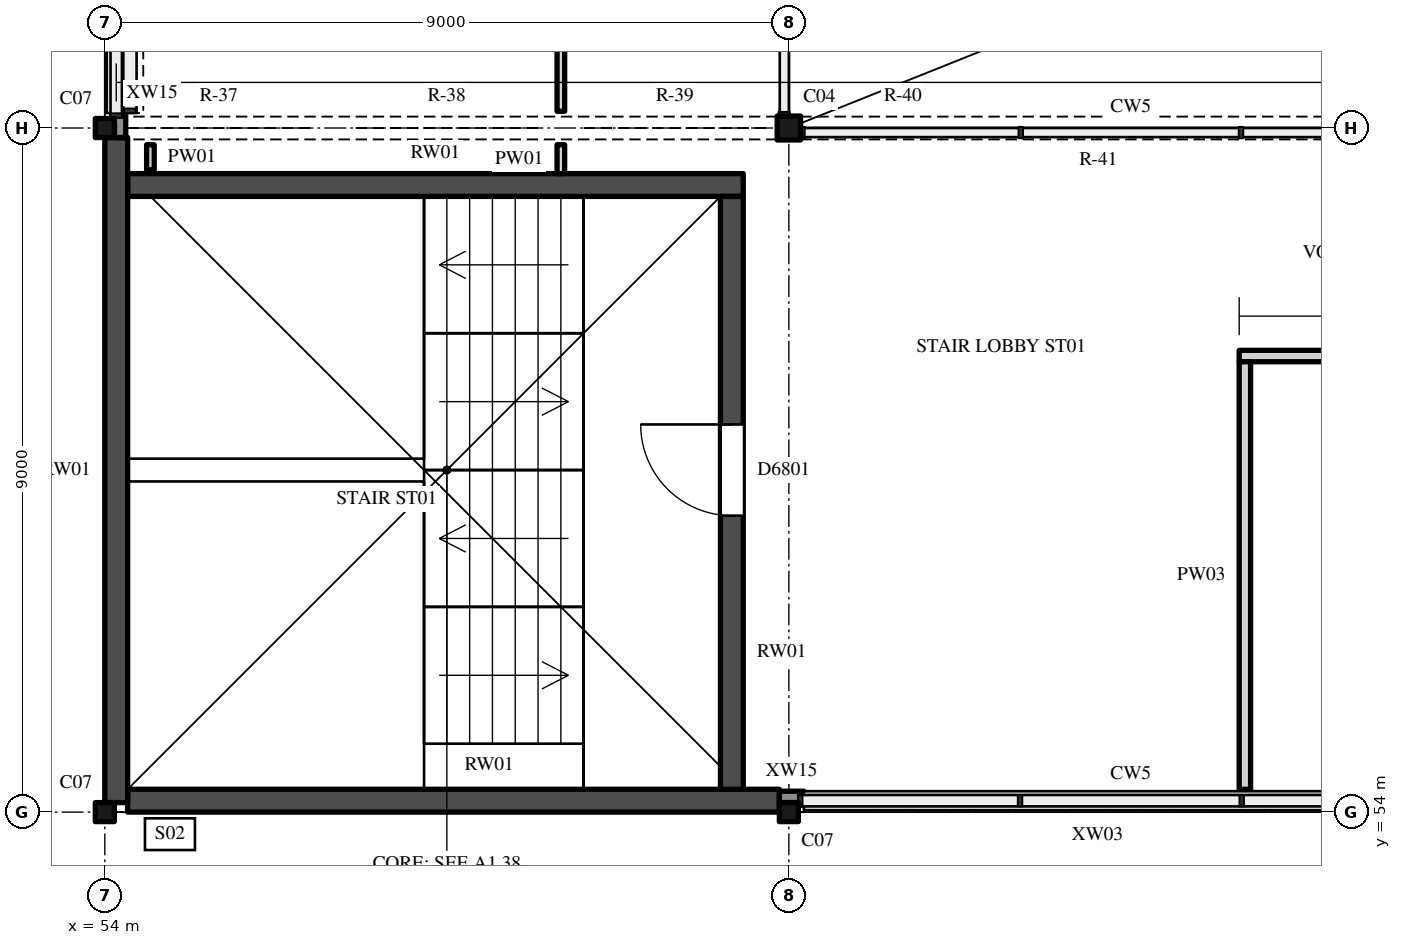
"""IFC4 building model, lengths in metres.
Left out: names, types, materials, properties, quantities, classifications, styles, units other than length and angle.
Written with IfcOpenShell. Run it as: python <this file> out.ifc"""

import sys

from ifc_helpers import new_model, si_unit, direction, frame, frame_2d, origin, origin_2d, place, context, subcontext, project, spatial, polyline, rectangle, hollow_rectangle, i_section, outline, extrude, element, fill, save


model = new_model("IFC4")
c1 = context("Model", 3, precision=1e-05, world=origin(), true_north=direction((0.0, 1.0)))
c2 = subcontext(c1, "Body", "Model", "MODEL_VIEW")
j1 = project(units=[si_unit("LENGTHUNIT", "METRE"), si_unit("PLANEANGLEUNIT", "RADIAN")], contexts=[c1])
p1 = place(None, origin())
s1 = spatial("IfcSite", under=j1, at=p1, CompositionType="ELEMENT")
p2 = place(p1, origin())
s2 = spatial("IfcBuilding", under=s1, at=p2, CompositionType="ELEMENT")
p3 = place(p2, frame((0.0, 0.0, 36.0)))
s3 = spatial("IfcBuildingStorey", under=s2, at=p3, CompositionType="ELEMENT", Elevation=36.0)
for number, where, z_axis, x_axis in (
    (1, (54.0, 54.0, 0.0), (0.0, 0.0, 1.0), (1.0, 0.0, 0.0)),
    (2, (63.0, 54.0, 0.0), (0.0, 0.0, 1.0), (1.0, 0.0, 0.0)),
    (3, (54.0, 63.0, 0.0), (0.0, 0.0, 1.0), (1.0, 0.0, 0.0)),
):
    element("IfcColumn", number, at=place(p3, frame(where, z_axis=z_axis, x_axis=x_axis)), inside=s3, PredefinedType="COLUMN", context=c2, shape_type="SweptSolid", body=[
        extrude(hollow_rectangle(XDim=0.25, YDim=0.25, WallThickness=0.009, InnerFilletRadius=0.013, OuterFilletRadius=0.022, at=origin_2d()), origin(), (0.0, 0.0, 1.0), 8.0),
    ])
p4 = place(p3, frame((63.0, 63.0, 0.0), z_axis=(0.0, 0.0, 1.0), x_axis=(1.0, 0.0, 0.0)))
e4 = element("IfcColumn", 4, at=p4, inside=s3, PredefinedType="COLUMN", context=c2, shape_type="SweptSolid", body=[
    extrude(i_section(OverallWidth=0.307, OverallDepth=0.315, WebThickness=0.012, FlangeThickness=0.019, FilletRadius=0.017, at=origin_2d()), origin(), (0.0, 0.0, 1.0), 8.0),
])
p5 = place(p3, frame((54.3, 54.15, 0.0), z_axis=(0.0, 0.0, 1.0), x_axis=(1.0, 0.0, 0.0)))
e5 = element("IfcWall", 5, at=p5, inside=s3, PredefinedType="SHEAR", context=c2, shape_type="SweptSolid", body=[
    extrude(rectangle(XDim=8.575, YDim=0.3, at=frame_2d((4.288, 0.0))), origin(), (0.0, 0.0, 1.0), 7.864),
])
p6 = place(p3, frame((54.3, 62.25, 0.0), z_axis=(0.0, 0.0, 1.0), x_axis=(1.0, 0.0, 0.0)))
e6 = element("IfcWall", 6, at=p6, inside=s3, PredefinedType="SHEAR", context=c2, shape_type="SweptSolid", body=[
    extrude(rectangle(XDim=8.1, YDim=0.3, at=frame_2d((4.05, 0.0))), origin(), (0.0, 0.0, 1.0), 14.344),
])
p7 = place(p3, frame((54.15, 54.125, 0.0), z_axis=(0.0, 0.0, 1.0), x_axis=(0.0, 1.0, 0.0)))
e7 = element("IfcWall", 7, at=p7, inside=s3, PredefinedType="SHEAR", context=c2, shape_type="SweptSolid", body=[
    extrude(outline(polyline([(0.0, 0.0), (8.75, 0.0), (8.75, 14.844), (0.0, 7.844), (0.0, 0.0)])), frame((0.0, 0.15, 0.0), z_axis=(0.0, -1.0, 0.0), x_axis=(1.0, 0.0, 0.0)), (0.0, 0.0, 1.0), 0.3),
])
p8 = place(p3, frame((62.25, 54.3, 0.0), z_axis=(0.0, 0.0, 1.0), x_axis=(0.0, 1.0, 0.0)))
e8 = element("IfcWall", 8, at=p8, inside=s3, PredefinedType="SHEAR", context=c2, shape_type="SweptSolid", body=[
    extrude(outline(polyline([(0.0, 0.0), (7.8, 0.0), (7.8, 14.224), (0.0, 7.984), (0.0, 0.0)])), frame((0.0, 0.15, 0.0), z_axis=(0.0, -1.0, 0.0), x_axis=(1.0, 0.0, 0.0)), (0.0, 0.0, 1.0), 0.3),
])
p9 = place(p8, frame((3.6, 0.0, 0.0)))
e9 = element("IfcOpeningElement", 9, at=p9, cuts=e8, PredefinedType="OPENING", context=c2, shape_type="SweptSolid", body=[
    extrude(rectangle(XDim=1.2, YDim=2.1, at=frame_2d((0.6, 1.05))), frame((0.0, 0.16, 0.0), z_axis=(0.0, -1.0, 0.0), x_axis=(1.0, 0.0, 0.0)), (0.0, 0.0, 1.0), 0.32),
])
for number, where, z_axis, x_axis in (
    (10, (63.197, 54.15, 0.0), (0.0, 0.0, 1.0), (1.0, 0.0, 0.0)),
    (11, (54.15, 63.197, 0.0), (0.0, 0.0, 1.0), (0.0, 1.0, 0.0)),
):
    element("IfcWall", number, at=place(p3, frame(where, z_axis=z_axis, x_axis=x_axis)), inside=s3, PredefinedType="SOLIDWALL", context=c2, shape_type="SweptSolid", body=[
        extrude(rectangle(XDim=8.642, YDim=0.25, at=frame_2d((4.321, 0.0))), origin(), (0.0, 0.0, 1.0), 1.1),
    ])
p10 = place(p3, frame((62.875, 54.2, 0.0), z_axis=(0.0, 0.0, 1.0), x_axis=(1.0, 0.0, 0.0)))
e12 = element("IfcWall", 12, at=p10, inside=s3, PredefinedType="SOLIDWALL", context=c2, shape_type="SweptSolid", body=[
    extrude(rectangle(XDim=0.322, YDim=0.15, at=frame_2d((0.161, 0.0))), origin(), (0.0, 0.0, 1.0), 7.864),
])
p11 = place(p3, frame((54.2, 62.875, 0.0), z_axis=(0.0, 0.0, 1.0), x_axis=(0.0, 1.0, 0.0)))
e13 = element("IfcWall", 13, at=p11, inside=s3, PredefinedType="SOLIDWALL", context=c2, shape_type="SweptSolid", body=[
    extrude(rectangle(XDim=0.322, YDim=0.15, at=frame_2d((0.161, 0.0))), origin(), (0.0, 0.0, 1.0), 14.844),
])
p12 = place(p3, frame((54.15, 63.0, 15.2), z_axis=(0.0, 0.0, 1.0), x_axis=(1.0, 0.0, 0.0)))
e14 = element("IfcWall", 14, at=p12, inside=s3, PredefinedType="SOLIDWALL", context=c2, shape_type="SweptSolid", body=[
    extrude(rectangle(XDim=62.7, YDim=0.3, at=frame_2d((31.35, 0.0))), origin(), (0.0, 0.0, 1.0), 0.9),
])
p13 = place(p12, frame((0.15, 0.0, 0.15)))
e15 = element("IfcOpeningElement", 15, at=p13, cuts=e14, PredefinedType="OPENING", context=c2, shape_type="SweptSolid", body=[
    extrude(rectangle(XDim=2.4, YDim=0.6, at=frame_2d((1.2, 0.3))), frame((0.0, 0.16, 0.0), z_axis=(0.0, -1.0, 0.0), x_axis=(1.0, 0.0, 0.0)), (0.0, 0.0, 1.0), 0.32),
])
p14 = place(p12, frame((3.15, 0.0, 0.15)))
e16 = element("IfcOpeningElement", 16, at=p14, cuts=e14, PredefinedType="OPENING", context=c2, shape_type="SweptSolid", body=[
    extrude(rectangle(XDim=2.4, YDim=0.6, at=frame_2d((1.2, 0.3))), frame((0.0, 0.16, 0.0), z_axis=(0.0, -1.0, 0.0), x_axis=(1.0, 0.0, 0.0)), (0.0, 0.0, 1.0), 0.32),
])
p15 = place(p12, frame((6.15, 0.0, 0.15)))
e17 = element("IfcOpeningElement", 17, at=p15, cuts=e14, PredefinedType="OPENING", context=c2, shape_type="SweptSolid", body=[
    extrude(rectangle(XDim=2.4, YDim=0.6, at=frame_2d((1.2, 0.3))), frame((0.0, 0.16, 0.0), z_axis=(0.0, -1.0, 0.0), x_axis=(1.0, 0.0, 0.0)), (0.0, 0.0, 1.0), 0.32),
])
p16 = place(p12, frame((9.15, 0.0, 0.15)))
e18 = element("IfcOpeningElement", 18, at=p16, cuts=e14, PredefinedType="OPENING", context=c2, shape_type="SweptSolid", body=[
    extrude(rectangle(XDim=2.4, YDim=0.6, at=frame_2d((1.2, 0.3))), frame((0.0, 0.16, 0.0), z_axis=(0.0, -1.0, 0.0), x_axis=(1.0, 0.0, 0.0)), (0.0, 0.0, 1.0), 0.32),
])
p17 = place(p12, frame((12.15, 0.0, 0.15)))
e19 = element("IfcOpeningElement", 19, at=p17, cuts=e14, PredefinedType="OPENING", context=c2, shape_type="SweptSolid", body=[
    extrude(rectangle(XDim=2.4, YDim=0.6, at=frame_2d((1.2, 0.3))), frame((0.0, 0.16, 0.0), z_axis=(0.0, -1.0, 0.0), x_axis=(1.0, 0.0, 0.0)), (0.0, 0.0, 1.0), 0.32),
])
p18 = place(p12, frame((15.15, 0.0, 0.15)))
e20 = element("IfcOpeningElement", 20, at=p18, cuts=e14, PredefinedType="OPENING", context=c2, shape_type="SweptSolid", body=[
    extrude(rectangle(XDim=2.4, YDim=0.6, at=frame_2d((1.2, 0.3))), frame((0.0, 0.16, 0.0), z_axis=(0.0, -1.0, 0.0), x_axis=(1.0, 0.0, 0.0)), (0.0, 0.0, 1.0), 0.32),
])
p19 = place(p12, frame((18.15, 0.0, 0.15)))
e21 = element("IfcOpeningElement", 21, at=p19, cuts=e14, PredefinedType="OPENING", context=c2, shape_type="SweptSolid", body=[
    extrude(rectangle(XDim=2.4, YDim=0.6, at=frame_2d((1.2, 0.3))), frame((0.0, 0.16, 0.0), z_axis=(0.0, -1.0, 0.0), x_axis=(1.0, 0.0, 0.0)), (0.0, 0.0, 1.0), 0.32),
])
p20 = place(p12, frame((21.15, 0.0, 0.15)))
e22 = element("IfcOpeningElement", 22, at=p20, cuts=e14, PredefinedType="OPENING", context=c2, shape_type="SweptSolid", body=[
    extrude(rectangle(XDim=2.4, YDim=0.6, at=frame_2d((1.2, 0.3))), frame((0.0, 0.16, 0.0), z_axis=(0.0, -1.0, 0.0), x_axis=(1.0, 0.0, 0.0)), (0.0, 0.0, 1.0), 0.32),
])
p21 = place(p12, frame((24.15, 0.0, 0.15)))
e23 = element("IfcOpeningElement", 23, at=p21, cuts=e14, PredefinedType="OPENING", context=c2, shape_type="SweptSolid", body=[
    extrude(rectangle(XDim=2.4, YDim=0.6, at=frame_2d((1.2, 0.3))), frame((0.0, 0.16, 0.0), z_axis=(0.0, -1.0, 0.0), x_axis=(1.0, 0.0, 0.0)), (0.0, 0.0, 1.0), 0.32),
])
p22 = place(p12, frame((27.15, 0.0, 0.15)))
e24 = element("IfcOpeningElement", 24, at=p22, cuts=e14, PredefinedType="OPENING", context=c2, shape_type="SweptSolid", body=[
    extrude(rectangle(XDim=2.4, YDim=0.6, at=frame_2d((1.2, 0.3))), frame((0.0, 0.16, 0.0), z_axis=(0.0, -1.0, 0.0), x_axis=(1.0, 0.0, 0.0)), (0.0, 0.0, 1.0), 0.32),
])
p23 = place(p12, frame((30.15, 0.0, 0.15)))
e25 = element("IfcOpeningElement", 25, at=p23, cuts=e14, PredefinedType="OPENING", context=c2, shape_type="SweptSolid", body=[
    extrude(rectangle(XDim=2.4, YDim=0.6, at=frame_2d((1.2, 0.3))), frame((0.0, 0.16, 0.0), z_axis=(0.0, -1.0, 0.0), x_axis=(1.0, 0.0, 0.0)), (0.0, 0.0, 1.0), 0.32),
])
p24 = place(p12, frame((33.15, 0.0, 0.15)))
e26 = element("IfcOpeningElement", 26, at=p24, cuts=e14, PredefinedType="OPENING", context=c2, shape_type="SweptSolid", body=[
    extrude(rectangle(XDim=2.4, YDim=0.6, at=frame_2d((1.2, 0.3))), frame((0.0, 0.16, 0.0), z_axis=(0.0, -1.0, 0.0), x_axis=(1.0, 0.0, 0.0)), (0.0, 0.0, 1.0), 0.32),
])
p25 = place(p12, frame((36.15, 0.0, 0.15)))
e27 = element("IfcOpeningElement", 27, at=p25, cuts=e14, PredefinedType="OPENING", context=c2, shape_type="SweptSolid", body=[
    extrude(rectangle(XDim=2.4, YDim=0.6, at=frame_2d((1.2, 0.3))), frame((0.0, 0.16, 0.0), z_axis=(0.0, -1.0, 0.0), x_axis=(1.0, 0.0, 0.0)), (0.0, 0.0, 1.0), 0.32),
])
p26 = place(p12, frame((39.15, 0.0, 0.15)))
e28 = element("IfcOpeningElement", 28, at=p26, cuts=e14, PredefinedType="OPENING", context=c2, shape_type="SweptSolid", body=[
    extrude(rectangle(XDim=2.4, YDim=0.6, at=frame_2d((1.2, 0.3))), frame((0.0, 0.16, 0.0), z_axis=(0.0, -1.0, 0.0), x_axis=(1.0, 0.0, 0.0)), (0.0, 0.0, 1.0), 0.32),
])
p27 = place(p12, frame((42.15, 0.0, 0.15)))
e29 = element("IfcOpeningElement", 29, at=p27, cuts=e14, PredefinedType="OPENING", context=c2, shape_type="SweptSolid", body=[
    extrude(rectangle(XDim=2.4, YDim=0.6, at=frame_2d((1.2, 0.3))), frame((0.0, 0.16, 0.0), z_axis=(0.0, -1.0, 0.0), x_axis=(1.0, 0.0, 0.0)), (0.0, 0.0, 1.0), 0.32),
])
p28 = place(p12, frame((45.15, 0.0, 0.15)))
e30 = element("IfcOpeningElement", 30, at=p28, cuts=e14, PredefinedType="OPENING", context=c2, shape_type="SweptSolid", body=[
    extrude(rectangle(XDim=2.4, YDim=0.6, at=frame_2d((1.2, 0.3))), frame((0.0, 0.16, 0.0), z_axis=(0.0, -1.0, 0.0), x_axis=(1.0, 0.0, 0.0)), (0.0, 0.0, 1.0), 0.32),
])
p29 = place(p12, frame((48.15, 0.0, 0.15)))
e31 = element("IfcOpeningElement", 31, at=p29, cuts=e14, PredefinedType="OPENING", context=c2, shape_type="SweptSolid", body=[
    extrude(rectangle(XDim=2.4, YDim=0.6, at=frame_2d((1.2, 0.3))), frame((0.0, 0.16, 0.0), z_axis=(0.0, -1.0, 0.0), x_axis=(1.0, 0.0, 0.0)), (0.0, 0.0, 1.0), 0.32),
])
p30 = place(p12, frame((51.15, 0.0, 0.15)))
e32 = element("IfcOpeningElement", 32, at=p30, cuts=e14, PredefinedType="OPENING", context=c2, shape_type="SweptSolid", body=[
    extrude(rectangle(XDim=2.4, YDim=0.6, at=frame_2d((1.2, 0.3))), frame((0.0, 0.16, 0.0), z_axis=(0.0, -1.0, 0.0), x_axis=(1.0, 0.0, 0.0)), (0.0, 0.0, 1.0), 0.32),
])
p31 = place(p12, frame((54.15, 0.0, 0.15)))
e33 = element("IfcOpeningElement", 33, at=p31, cuts=e14, PredefinedType="OPENING", context=c2, shape_type="SweptSolid", body=[
    extrude(rectangle(XDim=2.4, YDim=0.6, at=frame_2d((1.2, 0.3))), frame((0.0, 0.16, 0.0), z_axis=(0.0, -1.0, 0.0), x_axis=(1.0, 0.0, 0.0)), (0.0, 0.0, 1.0), 0.32),
])
p32 = place(p12, frame((57.15, 0.0, 0.15)))
e34 = element("IfcOpeningElement", 34, at=p32, cuts=e14, PredefinedType="OPENING", context=c2, shape_type="SweptSolid", body=[
    extrude(rectangle(XDim=2.4, YDim=0.6, at=frame_2d((1.2, 0.3))), frame((0.0, 0.16, 0.0), z_axis=(0.0, -1.0, 0.0), x_axis=(1.0, 0.0, 0.0)), (0.0, 0.0, 1.0), 0.32),
])
p33 = place(p12, frame((60.15, 0.0, 0.15)))
e35 = element("IfcOpeningElement", 35, at=p33, cuts=e14, PredefinedType="OPENING", context=c2, shape_type="SweptSolid", body=[
    extrude(rectangle(XDim=2.4, YDim=0.6, at=frame_2d((1.2, 0.3))), frame((0.0, 0.16, 0.0), z_axis=(0.0, -1.0, 0.0), x_axis=(1.0, 0.0, 0.0)), (0.0, 0.0, 1.0), 0.32),
])
p34 = place(p3, frame((54.331, 63.197, 11.0), z_axis=(0.0, 0.0, 1.0), x_axis=(0.0, 1.0, 0.0)))
e36 = element("IfcWall", 36, at=p34, inside=s3, PredefinedType="SOLIDWALL", context=c2, shape_type="SweptSolid", body=[
    extrude(outline(polyline([(0.0, 0.0), (4.303, 0.0), (4.303, 0.344), (0.0, 3.786), (0.0, 0.0)])), frame((0.0, 0.175, 0.0), z_axis=(0.0, -1.0, 0.0), x_axis=(1.0, 0.0, 0.0)), (0.0, 0.0, 1.0), 0.35),
])
p35 = place(p3, frame((68.925, 60.0, 0.0), z_axis=(0.0, 0.0, 1.0), x_axis=(1.0, 0.0, 0.0)))
e37 = element("IfcWall", 37, at=p35, inside=s3, PredefinedType="PARTITIONING", context=c2, shape_type="SweptSolid", body=[
    extrude(rectangle(XDim=33.15, YDim=0.15, at=frame_2d((16.575, 0.0))), origin(), (0.0, 0.0, 1.0), 7.744),
])
p36 = place(p35, frame((15.625, 0.0, 0.0)))
e38 = element("IfcOpeningElement", 38, at=p36, cuts=e37, PredefinedType="OPENING", context=c2, shape_type="SweptSolid", body=[
    extrude(rectangle(XDim=1.8, YDim=2.4, at=frame_2d((0.9, 1.2))), frame((0.0, 0.085, 0.0), z_axis=(0.0, -1.0, 0.0), x_axis=(1.0, 0.0, 0.0)), (0.0, 0.0, 1.0), 0.17),
])
p37 = place(p3, frame((54.6, 62.45, 0.0), z_axis=(0.0, 0.0, 1.0), x_axis=(0.0, 1.0, 0.0)))
e39 = element("IfcWall", 39, at=p37, inside=s3, PredefinedType="PARTITIONING", context=c2, shape_type="SweptSolid", body=[
    extrude(rectangle(XDim=0.33, YDim=0.1, at=frame_2d((0.165, 0.0))), origin(), (0.0, 0.0, 1.0), 7.744),
])
p38 = place(p3, frame((60.0, 62.4, 0.0), z_axis=(0.0, 0.0, 1.0), x_axis=(0.0, 1.0, 0.0)))
e40 = element("IfcWall", 40, at=p38, inside=s3, PredefinedType="PARTITIONING", context=c2, shape_type="SweptSolid", body=[
    extrude(rectangle(XDim=0.38, YDim=0.1, at=frame_2d((0.19, 0.0))), origin(), (0.0, 0.0, 1.0), 7.744),
])
p39 = place(p3, frame((60.0, 63.22, 0.0), z_axis=(0.0, 0.0, 1.0), x_axis=(0.0, 1.0, 0.0)))
e41 = element("IfcWall", 41, at=p39, inside=s3, PredefinedType="PARTITIONING", context=c2, shape_type="SweptSolid", body=[
    extrude(rectangle(XDim=8.73, YDim=0.1, at=frame_2d((4.365, 0.0))), origin(), (0.0, 0.0, 1.0), 7.744),
])
p40 = place(p39, frame((3.75, 0.0, 0.0)))
e42 = element("IfcOpeningElement", 42, at=p40, cuts=e41, PredefinedType="OPENING", context=c2, shape_type="SweptSolid", body=[
    extrude(rectangle(XDim=1.2, YDim=2.4, at=frame_2d((0.6, 1.2))), frame((0.0, 0.06, 0.0), z_axis=(0.0, -1.0, 0.0), x_axis=(1.0, 0.0, 0.0)), (0.0, 0.0, 1.0), 0.12),
])
p41 = place(p3, frame((69.0, 54.3, 0.0), z_axis=(0.0, 0.0, 1.0), x_axis=(0.0, 1.0, 0.0)))
e43 = element("IfcWall", 43, at=p41, inside=s3, PredefinedType="PARTITIONING", context=c2, shape_type="SweptSolid", body=[
    extrude(rectangle(XDim=5.625, YDim=0.15, at=frame_2d((2.812, 0.0))), origin(), (0.0, 0.0, 1.0), 7.744),
])
p42 = place(p9, origin())
e44 = element("IfcDoor", 44, at=p42, inside=s3, OperationType="SINGLE_SWING_LEFT", PredefinedType="DOOR", context=c2, shape_type="SweptSolid", body=[
    extrude(rectangle(XDim=1.2, YDim=2.1, at=frame_2d((0.6, 1.05))), frame((0.0, 0.025, 0.0), z_axis=(0.0, -1.0, 0.0), x_axis=(1.0, 0.0, 0.0)), (0.0, 0.0, 1.0), 0.05),
])
fill(e9, e44)
p43 = place(p13, origin())
e45 = element("IfcWindow", 45, at=p43, inside=s3, PartitioningType="SINGLE_PANEL", PredefinedType="SKYLIGHT", context=c2, shape_type="SweptSolid", body=[
    extrude(rectangle(XDim=2.4, YDim=0.6, at=frame_2d((1.2, 0.3))), frame((0.0, 0.03, 0.0), z_axis=(0.0, -1.0, 0.0), x_axis=(1.0, 0.0, 0.0)), (0.0, 0.0, 1.0), 0.06),
])
fill(e15, e45)
p44 = place(p14, origin())
e46 = element("IfcWindow", 46, at=p44, inside=s3, PartitioningType="SINGLE_PANEL", PredefinedType="SKYLIGHT", context=c2, shape_type="SweptSolid", body=[
    extrude(rectangle(XDim=2.4, YDim=0.6, at=frame_2d((1.2, 0.3))), frame((0.0, 0.03, 0.0), z_axis=(0.0, -1.0, 0.0), x_axis=(1.0, 0.0, 0.0)), (0.0, 0.0, 1.0), 0.06),
])
fill(e16, e46)
p45 = place(p15, origin())
e47 = element("IfcWindow", 47, at=p45, inside=s3, PartitioningType="SINGLE_PANEL", PredefinedType="SKYLIGHT", context=c2, shape_type="SweptSolid", body=[
    extrude(rectangle(XDim=2.4, YDim=0.6, at=frame_2d((1.2, 0.3))), frame((0.0, 0.03, 0.0), z_axis=(0.0, -1.0, 0.0), x_axis=(1.0, 0.0, 0.0)), (0.0, 0.0, 1.0), 0.06),
])
fill(e17, e47)
p46 = place(p16, origin())
e48 = element("IfcWindow", 48, at=p46, inside=s3, PartitioningType="SINGLE_PANEL", PredefinedType="SKYLIGHT", context=c2, shape_type="SweptSolid", body=[
    extrude(rectangle(XDim=2.4, YDim=0.6, at=frame_2d((1.2, 0.3))), frame((0.0, 0.03, 0.0), z_axis=(0.0, -1.0, 0.0), x_axis=(1.0, 0.0, 0.0)), (0.0, 0.0, 1.0), 0.06),
])
fill(e18, e48)
p47 = place(p17, origin())
e49 = element("IfcWindow", 49, at=p47, inside=s3, PartitioningType="SINGLE_PANEL", PredefinedType="SKYLIGHT", context=c2, shape_type="SweptSolid", body=[
    extrude(rectangle(XDim=2.4, YDim=0.6, at=frame_2d((1.2, 0.3))), frame((0.0, 0.03, 0.0), z_axis=(0.0, -1.0, 0.0), x_axis=(1.0, 0.0, 0.0)), (0.0, 0.0, 1.0), 0.06),
])
fill(e19, e49)
p48 = place(p18, origin())
e50 = element("IfcWindow", 50, at=p48, inside=s3, PartitioningType="SINGLE_PANEL", PredefinedType="SKYLIGHT", context=c2, shape_type="SweptSolid", body=[
    extrude(rectangle(XDim=2.4, YDim=0.6, at=frame_2d((1.2, 0.3))), frame((0.0, 0.03, 0.0), z_axis=(0.0, -1.0, 0.0), x_axis=(1.0, 0.0, 0.0)), (0.0, 0.0, 1.0), 0.06),
])
fill(e20, e50)
save(model, sys.argv[1])
